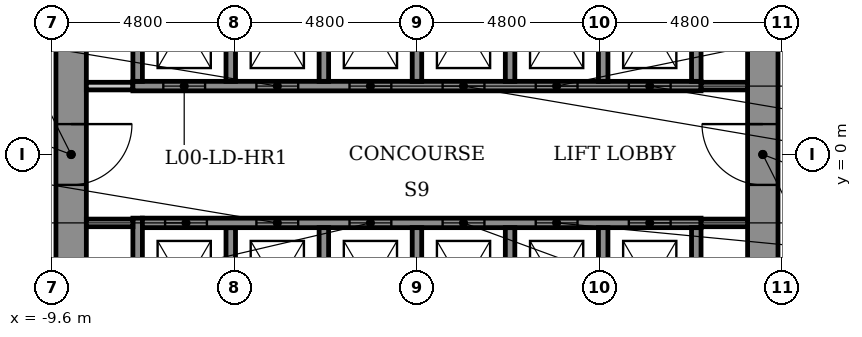
"""IFC4 building model, lengths in metres.
Left out: names, types, materials, properties, quantities, classifications, styles, units other than length and angle.
Written with IfcOpenShell. Run it as: python <this file> out.ifc"""

import sys

from ifc_helpers import new_model, si_unit, direction, frame, frame_2d, origin, place, context, subcontext, project, spatial, rectangle, extrude, element, fill, save


model = new_model("IFC4")
c1 = context("Model", 3, precision=1e-05, world=origin(), true_north=direction((0.0, 1.0)))
c2 = subcontext(c1, "Body", "Model", "MODEL_VIEW")
j1 = project(units=[si_unit("LENGTHUNIT", "METRE"), si_unit("PLANEANGLEUNIT", "RADIAN")], contexts=[c1])
p1 = place(None, origin())
s1 = spatial("IfcSite", under=j1, at=p1, CompositionType="ELEMENT")
p2 = place(p1, origin())
s2 = spatial("IfcBuilding", under=s1, at=p2, CompositionType="ELEMENT")
p3 = place(p2, origin())
s3 = spatial("IfcBuildingStorey", under=s2, at=p3, CompositionType="ELEMENT", Elevation=0.0)
p4 = place(p3, frame((9.1, -5.485, -0.5), z_axis=(0.0, 0.0, 1.0), x_axis=(0.0, 1.0, 0.0)))
e1 = element("IfcWall", 1, at=p4, inside=s3, PredefinedType="SHEAR", context=c2, shape_type="SweptSolid", body=[
    extrude(rectangle(XDim=10.97, YDim=0.8, at=frame_2d((5.485, 0.0))), origin(), (0.0, 0.0, 1.0), 7.5),
])
p5 = place(p4, frame((4.685, 0.0, 0.5)))
e2 = element("IfcOpeningElement", 2, at=p5, cuts=e1, PredefinedType="OPENING", context=c2, shape_type="SweptSolid", body=[
    extrude(rectangle(XDim=1.6, YDim=2.1, at=frame_2d((0.8, 1.05))), frame((0.0, 0.41, 0.0), z_axis=(0.0, -1.0, 0.0), x_axis=(1.0, 0.0, 0.0)), (0.0, 0.0, 1.0), 0.82),
])
p6 = place(p3, frame((-9.1, 5.485, -0.5), z_axis=(0.0, 0.0, 1.0), x_axis=(0.0, -1.0, 0.0)))
e3 = element("IfcWall", 3, at=p6, inside=s3, PredefinedType="SHEAR", context=c2, shape_type="SweptSolid", body=[
    extrude(rectangle(XDim=10.97, YDim=0.8, at=frame_2d((5.485, 0.0))), origin(), (0.0, 0.0, 1.0), 7.5),
])
p7 = place(p6, frame((4.685, 0.0, 0.5)))
e4 = element("IfcOpeningElement", 4, at=p7, cuts=e3, PredefinedType="OPENING", context=c2, shape_type="SweptSolid", body=[
    extrude(rectangle(XDim=1.6, YDim=2.1, at=frame_2d((0.8, 1.05))), frame((0.0, 0.41, 0.0), z_axis=(0.0, -1.0, 0.0), x_axis=(1.0, 0.0, 0.0)), (0.0, 0.0, 1.0), 0.82),
])
p8 = place(p3, frame((-8.7, 1.8, 0.0), z_axis=(0.0, 0.0, 1.0), x_axis=(1.0, 0.0, 0.0)))
e5 = element("IfcWall", 5, at=p8, inside=s3, PredefinedType="PARTITIONING", context=c2, shape_type="SweptSolid", body=[
    extrude(rectangle(XDim=1.225, YDim=0.2, at=frame_2d((0.613, 0.0))), origin(), (0.0, 0.0, 1.0), 6.6),
])
p9 = place(p3, frame((-7.475, 1.8, 0.0), z_axis=(0.0, 0.0, 1.0), x_axis=(1.0, 0.0, 0.0)))
e6 = element("IfcWall", 6, at=p9, inside=s3, PredefinedType="SHEAR", context=c2, shape_type="SweptSolid", body=[
    extrude(rectangle(XDim=14.95, YDim=0.25, at=frame_2d((7.475, 0.0))), origin(), (0.0, 0.0, 1.0), 6.6),
])
p10 = place(p9, frame((0.8, 0.0, 0.0)))
e7 = element("IfcOpeningElement", 7, at=p10, cuts=e6, PredefinedType="OPENING", context=c2, shape_type="SweptSolid", body=[
    extrude(rectangle(XDim=1.1, YDim=2.1, at=frame_2d((0.55, 1.05))), frame((0.0, 0.135, 0.0), z_axis=(0.0, -1.0, 0.0), x_axis=(1.0, 0.0, 0.0)), (0.0, 0.0, 1.0), 0.27),
])
p11 = place(p9, frame((3.25, 0.0, 0.0)))
e8 = element("IfcOpeningElement", 8, at=p11, cuts=e6, PredefinedType="OPENING", context=c2, shape_type="SweptSolid", body=[
    extrude(rectangle(XDim=1.1, YDim=2.1, at=frame_2d((0.55, 1.05))), frame((0.0, 0.135, 0.0), z_axis=(0.0, -1.0, 0.0), x_axis=(1.0, 0.0, 0.0)), (0.0, 0.0, 1.0), 0.27),
])
p12 = place(p9, frame((5.7, 0.0, 0.0)))
e9 = element("IfcOpeningElement", 9, at=p12, cuts=e6, PredefinedType="OPENING", context=c2, shape_type="SweptSolid", body=[
    extrude(rectangle(XDim=1.1, YDim=2.1, at=frame_2d((0.55, 1.05))), frame((0.0, 0.135, 0.0), z_axis=(0.0, -1.0, 0.0), x_axis=(1.0, 0.0, 0.0)), (0.0, 0.0, 1.0), 0.27),
])
p13 = place(p9, frame((8.15, 0.0, 0.0)))
e10 = element("IfcOpeningElement", 10, at=p13, cuts=e6, PredefinedType="OPENING", context=c2, shape_type="SweptSolid", body=[
    extrude(rectangle(XDim=1.1, YDim=2.1, at=frame_2d((0.55, 1.05))), frame((0.0, 0.135, 0.0), z_axis=(0.0, -1.0, 0.0), x_axis=(1.0, 0.0, 0.0)), (0.0, 0.0, 1.0), 0.27),
])
p14 = place(p9, frame((10.6, 0.0, 0.0)))
e11 = element("IfcOpeningElement", 11, at=p14, cuts=e6, PredefinedType="OPENING", context=c2, shape_type="SweptSolid", body=[
    extrude(rectangle(XDim=1.1, YDim=2.1, at=frame_2d((0.55, 1.05))), frame((0.0, 0.135, 0.0), z_axis=(0.0, -1.0, 0.0), x_axis=(1.0, 0.0, 0.0)), (0.0, 0.0, 1.0), 0.27),
])
p15 = place(p9, frame((13.05, 0.0, 0.0)))
e12 = element("IfcOpeningElement", 12, at=p15, cuts=e6, PredefinedType="OPENING", context=c2, shape_type="SweptSolid", body=[
    extrude(rectangle(XDim=1.1, YDim=2.1, at=frame_2d((0.55, 1.05))), frame((0.0, 0.135, 0.0), z_axis=(0.0, -1.0, 0.0), x_axis=(1.0, 0.0, 0.0)), (0.0, 0.0, 1.0), 0.27),
])
p16 = place(p3, frame((-7.35, -5.73, 0.0), z_axis=(0.0, 0.0, 1.0), x_axis=(0.0, 1.0, 0.0)))
e13 = element("IfcWall", 13, at=p16, inside=s3, PredefinedType="SHEAR", context=c2, shape_type="SweptSolid", body=[
    extrude(rectangle(XDim=4.055, YDim=0.25, at=frame_2d((2.028, 0.0))), origin(), (0.0, 0.0, 1.0), 6.6),
])
p17 = place(p3, frame((-7.35, 1.925, 0.0), z_axis=(0.0, 0.0, 1.0), x_axis=(0.0, 1.0, 0.0)))
e14 = element("IfcWall", 14, at=p17, inside=s3, PredefinedType="SHEAR", context=c2, shape_type="SweptSolid", body=[
    extrude(rectangle(XDim=3.805, YDim=0.25, at=frame_2d((1.903, 0.0))), origin(), (0.0, 0.0, 1.0), 6.6),
])
p18 = place(p3, frame((-7.475, -1.8, 0.0), z_axis=(0.0, 0.0, 1.0), x_axis=(-1.0, 0.0, 0.0)))
e15 = element("IfcWall", 15, at=p18, inside=s3, PredefinedType="PARTITIONING", context=c2, shape_type="SweptSolid", body=[
    extrude(rectangle(XDim=1.225, YDim=0.2, at=frame_2d((0.613, 0.0))), origin(), (0.0, 0.0, 1.0), 6.6),
])
for number, where, z_axis, x_axis in (
    (16, (-4.9, -1.925, 0.0), (0.0, 0.0, 1.0), (0.0, -1.0, 0.0)),
    (17, (-4.9, 5.025, 0.0), (0.0, 0.0, 1.0), (0.0, -1.0, 0.0)),
):
    element("IfcWall", number, at=place(p3, frame(where, z_axis=z_axis, x_axis=x_axis)), inside=s3, PredefinedType="SHEAR", context=c2, shape_type="SweptSolid", body=[
        extrude(rectangle(XDim=3.1, YDim=0.25, at=frame_2d((1.55, 0.0))), origin(), (0.0, 0.0, 1.0), 7.0),
    ])
p19 = place(p3, frame((-7.225, -1.8, 0.0), z_axis=(0.0, 0.0, 1.0), x_axis=(1.0, 0.0, 0.0)))
e18 = element("IfcWall", 18, at=p19, inside=s3, PredefinedType="SHEAR", context=c2, shape_type="SweptSolid", body=[
    extrude(rectangle(XDim=14.7, YDim=0.25, at=frame_2d((7.35, 0.0))), origin(), (0.0, 0.0, 1.0), 6.6),
])
p20 = place(p19, frame((0.597, 0.0, 0.0)))
e19 = element("IfcOpeningElement", 19, at=p20, cuts=e18, PredefinedType="OPENING", context=c2, shape_type="SweptSolid", body=[
    extrude(rectangle(XDim=1.1, YDim=2.1, at=frame_2d((0.55, 1.05))), frame((0.0, 0.135, 0.0), z_axis=(0.0, -1.0, 0.0), x_axis=(1.0, 0.0, 0.0)), (0.0, 0.0, 1.0), 0.27),
])
p21 = place(p19, frame((3.0, 0.0, 0.0)))
e20 = element("IfcOpeningElement", 20, at=p21, cuts=e18, PredefinedType="OPENING", context=c2, shape_type="SweptSolid", body=[
    extrude(rectangle(XDim=1.1, YDim=2.1, at=frame_2d((0.55, 1.05))), frame((0.0, 0.135, 0.0), z_axis=(0.0, -1.0, 0.0), x_axis=(1.0, 0.0, 0.0)), (0.0, 0.0, 1.0), 0.27),
])
p22 = place(p19, frame((5.45, 0.0, 0.0)))
e21 = element("IfcOpeningElement", 21, at=p22, cuts=e18, PredefinedType="OPENING", context=c2, shape_type="SweptSolid", body=[
    extrude(rectangle(XDim=1.1, YDim=2.1, at=frame_2d((0.55, 1.05))), frame((0.0, 0.135, 0.0), z_axis=(0.0, -1.0, 0.0), x_axis=(1.0, 0.0, 0.0)), (0.0, 0.0, 1.0), 0.27),
])
p23 = place(p19, frame((7.9, 0.0, 0.0)))
e22 = element("IfcOpeningElement", 22, at=p23, cuts=e18, PredefinedType="OPENING", context=c2, shape_type="SweptSolid", body=[
    extrude(rectangle(XDim=1.1, YDim=2.1, at=frame_2d((0.55, 1.05))), frame((0.0, 0.135, 0.0), z_axis=(0.0, -1.0, 0.0), x_axis=(1.0, 0.0, 0.0)), (0.0, 0.0, 1.0), 0.27),
])
p24 = place(p19, frame((10.35, 0.0, 0.0)))
e23 = element("IfcOpeningElement", 23, at=p24, cuts=e18, PredefinedType="OPENING", context=c2, shape_type="SweptSolid", body=[
    extrude(rectangle(XDim=1.1, YDim=2.1, at=frame_2d((0.55, 1.05))), frame((0.0, 0.135, 0.0), z_axis=(0.0, -1.0, 0.0), x_axis=(1.0, 0.0, 0.0)), (0.0, 0.0, 1.0), 0.27),
])
p25 = place(p19, frame((12.8, 0.0, 0.0)))
e24 = element("IfcOpeningElement", 24, at=p25, cuts=e18, PredefinedType="OPENING", context=c2, shape_type="SweptSolid", body=[
    extrude(rectangle(XDim=1.1, YDim=2.1, at=frame_2d((0.55, 1.05))), frame((0.0, 0.135, 0.0), z_axis=(0.0, -1.0, 0.0), x_axis=(1.0, 0.0, 0.0)), (0.0, 0.0, 1.0), 0.27),
])
for number, where, z_axis, x_axis in (
    (25, (-2.45, -1.925, 0.0), (0.0, 0.0, 1.0), (0.0, -1.0, 0.0)),
    (26, (-2.45, 5.025, 0.0), (0.0, 0.0, 1.0), (0.0, -1.0, 0.0)),
    (27, (0.0, -1.925, 0.0), (0.0, 0.0, 1.0), (0.0, -1.0, 0.0)),
    (28, (0.0, 5.025, 0.0), (0.0, 0.0, 1.0), (0.0, -1.0, 0.0)),
    (29, (2.45, -1.925, 0.0), (0.0, 0.0, 1.0), (0.0, -1.0, 0.0)),
    (30, (2.45, 5.025, 0.0), (0.0, 0.0, 1.0), (0.0, -1.0, 0.0)),
    (31, (4.9, -1.925, 0.0), (0.0, 0.0, 1.0), (0.0, -1.0, 0.0)),
    (32, (4.9, 5.025, 0.0), (0.0, 0.0, 1.0), (0.0, -1.0, 0.0)),
):
    element("IfcWall", number, at=place(p3, frame(where, z_axis=z_axis, x_axis=x_axis)), inside=s3, PredefinedType="SHEAR", context=c2, shape_type="SweptSolid", body=[
        extrude(rectangle(XDim=3.1, YDim=0.25, at=frame_2d((1.55, 0.0))), origin(), (0.0, 0.0, 1.0), 7.0),
    ])
p26 = place(p3, frame((7.475, 1.8, 0.0), z_axis=(0.0, 0.0, 1.0), x_axis=(1.0, 0.0, 0.0)))
e33 = element("IfcWall", 33, at=p26, inside=s3, PredefinedType="PARTITIONING", context=c2, shape_type="SweptSolid", body=[
    extrude(rectangle(XDim=1.225, YDim=0.2, at=frame_2d((0.613, 0.0))), origin(), (0.0, 0.0, 1.0), 6.6),
])
for number, where, z_axis, x_axis in (
    (34, (7.35, -1.925, 0.0), (0.0, 0.0, 1.0), (0.0, -1.0, 0.0)),
    (35, (7.35, 5.73, 0.0), (0.0, 0.0, 1.0), (0.0, -1.0, 0.0)),
):
    element("IfcWall", number, at=place(p3, frame(where, z_axis=z_axis, x_axis=x_axis)), inside=s3, PredefinedType="SHEAR", context=c2, shape_type="SweptSolid", body=[
        extrude(rectangle(XDim=3.805, YDim=0.25, at=frame_2d((1.903, 0.0))), origin(), (0.0, 0.0, 1.0), 6.6),
    ])
p27 = place(p3, frame((8.7, -1.8, 0.0), z_axis=(0.0, 0.0, 1.0), x_axis=(-1.0, 0.0, 0.0)))
e36 = element("IfcWall", 36, at=p27, inside=s3, PredefinedType="PARTITIONING", context=c2, shape_type="SweptSolid", body=[
    extrude(rectangle(XDim=1.225, YDim=0.2, at=frame_2d((0.613, 0.0))), origin(), (0.0, 0.0, 1.0), 6.6),
])
p28 = place(p10, origin())
e37 = element("IfcDoor", 37, at=p28, inside=s3, OperationType="SLIDING_TO_LEFT", PredefinedType="DOOR", context=c2, shape_type="SweptSolid", body=[
    extrude(rectangle(XDim=1.1, YDim=2.1, at=frame_2d((0.55, 1.05))), frame((0.0, 0.025, 0.0), z_axis=(0.0, -1.0, 0.0), x_axis=(1.0, 0.0, 0.0)), (0.0, 0.0, 1.0), 0.05),
])
fill(e7, e37)
p29 = place(p11, origin())
e38 = element("IfcDoor", 38, at=p29, inside=s3, OperationType="SLIDING_TO_LEFT", PredefinedType="DOOR", context=c2, shape_type="SweptSolid", body=[
    extrude(rectangle(XDim=1.1, YDim=2.1, at=frame_2d((0.55, 1.05))), frame((0.0, 0.025, 0.0), z_axis=(0.0, -1.0, 0.0), x_axis=(1.0, 0.0, 0.0)), (0.0, 0.0, 1.0), 0.05),
])
fill(e8, e38)
p30 = place(p12, origin())
e39 = element("IfcDoor", 39, at=p30, inside=s3, OperationType="SLIDING_TO_LEFT", PredefinedType="DOOR", context=c2, shape_type="SweptSolid", body=[
    extrude(rectangle(XDim=1.1, YDim=2.1, at=frame_2d((0.55, 1.05))), frame((0.0, 0.025, 0.0), z_axis=(0.0, -1.0, 0.0), x_axis=(1.0, 0.0, 0.0)), (0.0, 0.0, 1.0), 0.05),
])
fill(e9, e39)
p31 = place(p13, origin())
e40 = element("IfcDoor", 40, at=p31, inside=s3, OperationType="SLIDING_TO_LEFT", PredefinedType="DOOR", context=c2, shape_type="SweptSolid", body=[
    extrude(rectangle(XDim=1.1, YDim=2.1, at=frame_2d((0.55, 1.05))), frame((0.0, 0.025, 0.0), z_axis=(0.0, -1.0, 0.0), x_axis=(1.0, 0.0, 0.0)), (0.0, 0.0, 1.0), 0.05),
])
fill(e10, e40)
p32 = place(p14, origin())
e41 = element("IfcDoor", 41, at=p32, inside=s3, OperationType="SLIDING_TO_LEFT", PredefinedType="DOOR", context=c2, shape_type="SweptSolid", body=[
    extrude(rectangle(XDim=1.1, YDim=2.1, at=frame_2d((0.55, 1.05))), frame((0.0, 0.025, 0.0), z_axis=(0.0, -1.0, 0.0), x_axis=(1.0, 0.0, 0.0)), (0.0, 0.0, 1.0), 0.05),
])
fill(e11, e41)
p33 = place(p15, origin())
e42 = element("IfcDoor", 42, at=p33, inside=s3, OperationType="SLIDING_TO_LEFT", PredefinedType="DOOR", context=c2, shape_type="SweptSolid", body=[
    extrude(rectangle(XDim=1.1, YDim=2.1, at=frame_2d((0.55, 1.05))), frame((0.0, 0.025, 0.0), z_axis=(0.0, -1.0, 0.0), x_axis=(1.0, 0.0, 0.0)), (0.0, 0.0, 1.0), 0.05),
])
fill(e12, e42)
p34 = place(p20, origin())
e43 = element("IfcDoor", 43, at=p34, inside=s3, OperationType="SLIDING_TO_LEFT", PredefinedType="DOOR", context=c2, shape_type="SweptSolid", body=[
    extrude(rectangle(XDim=1.1, YDim=2.1, at=frame_2d((0.55, 1.05))), frame((0.0, 0.025, 0.0), z_axis=(0.0, -1.0, 0.0), x_axis=(1.0, 0.0, 0.0)), (0.0, 0.0, 1.0), 0.05),
])
fill(e19, e43)
p35 = place(p21, origin())
e44 = element("IfcDoor", 44, at=p35, inside=s3, OperationType="SLIDING_TO_LEFT", PredefinedType="DOOR", context=c2, shape_type="SweptSolid", body=[
    extrude(rectangle(XDim=1.1, YDim=2.1, at=frame_2d((0.55, 1.05))), frame((0.0, 0.025, 0.0), z_axis=(0.0, -1.0, 0.0), x_axis=(1.0, 0.0, 0.0)), (0.0, 0.0, 1.0), 0.05),
])
fill(e20, e44)
p36 = place(p22, origin())
e45 = element("IfcDoor", 45, at=p36, inside=s3, OperationType="SLIDING_TO_LEFT", PredefinedType="DOOR", context=c2, shape_type="SweptSolid", body=[
    extrude(rectangle(XDim=1.1, YDim=2.1, at=frame_2d((0.55, 1.05))), frame((0.0, 0.025, 0.0), z_axis=(0.0, -1.0, 0.0), x_axis=(1.0, 0.0, 0.0)), (0.0, 0.0, 1.0), 0.05),
])
fill(e21, e45)
p37 = place(p23, origin())
e46 = element("IfcDoor", 46, at=p37, inside=s3, OperationType="SLIDING_TO_LEFT", PredefinedType="DOOR", context=c2, shape_type="SweptSolid", body=[
    extrude(rectangle(XDim=1.1, YDim=2.1, at=frame_2d((0.55, 1.05))), frame((0.0, 0.025, 0.0), z_axis=(0.0, -1.0, 0.0), x_axis=(1.0, 0.0, 0.0)), (0.0, 0.0, 1.0), 0.05),
])
fill(e22, e46)
p38 = place(p24, origin())
e47 = element("IfcDoor", 47, at=p38, inside=s3, OperationType="SLIDING_TO_LEFT", PredefinedType="DOOR", context=c2, shape_type="SweptSolid", body=[
    extrude(rectangle(XDim=1.1, YDim=2.1, at=frame_2d((0.55, 1.05))), frame((0.0, 0.025, 0.0), z_axis=(0.0, -1.0, 0.0), x_axis=(1.0, 0.0, 0.0)), (0.0, 0.0, 1.0), 0.05),
])
fill(e23, e47)
p39 = place(p25, origin())
e48 = element("IfcDoor", 48, at=p39, inside=s3, OperationType="SLIDING_TO_LEFT", PredefinedType="DOOR", context=c2, shape_type="SweptSolid", body=[
    extrude(rectangle(XDim=1.1, YDim=2.1, at=frame_2d((0.55, 1.05))), frame((0.0, 0.025, 0.0), z_axis=(0.0, -1.0, 0.0), x_axis=(1.0, 0.0, 0.0)), (0.0, 0.0, 1.0), 0.05),
])
fill(e24, e48)
p40 = place(p5, origin())
e49 = element("IfcDoor", 49, at=p40, inside=s3, OperationType="SINGLE_SWING_RIGHT", PredefinedType="DOOR", context=c2, shape_type="SweptSolid", body=[
    extrude(rectangle(XDim=1.6, YDim=2.1, at=frame_2d((0.8, 1.05))), frame((0.0, 0.025, 0.0), z_axis=(0.0, -1.0, 0.0), x_axis=(1.0, 0.0, 0.0)), (0.0, 0.0, 1.0), 0.05),
])
fill(e2, e49)
p41 = place(p7, origin())
e50 = element("IfcDoor", 50, at=p41, inside=s3, OperationType="SINGLE_SWING_LEFT", PredefinedType="DOOR", context=c2, shape_type="SweptSolid", body=[
    extrude(rectangle(XDim=1.6, YDim=2.1, at=frame_2d((0.8, 1.05))), frame((0.0, 0.025, 0.0), z_axis=(0.0, -1.0, 0.0), x_axis=(1.0, 0.0, 0.0)), (0.0, 0.0, 1.0), 0.05),
])
fill(e4, e50)
save(model, sys.argv[1])
